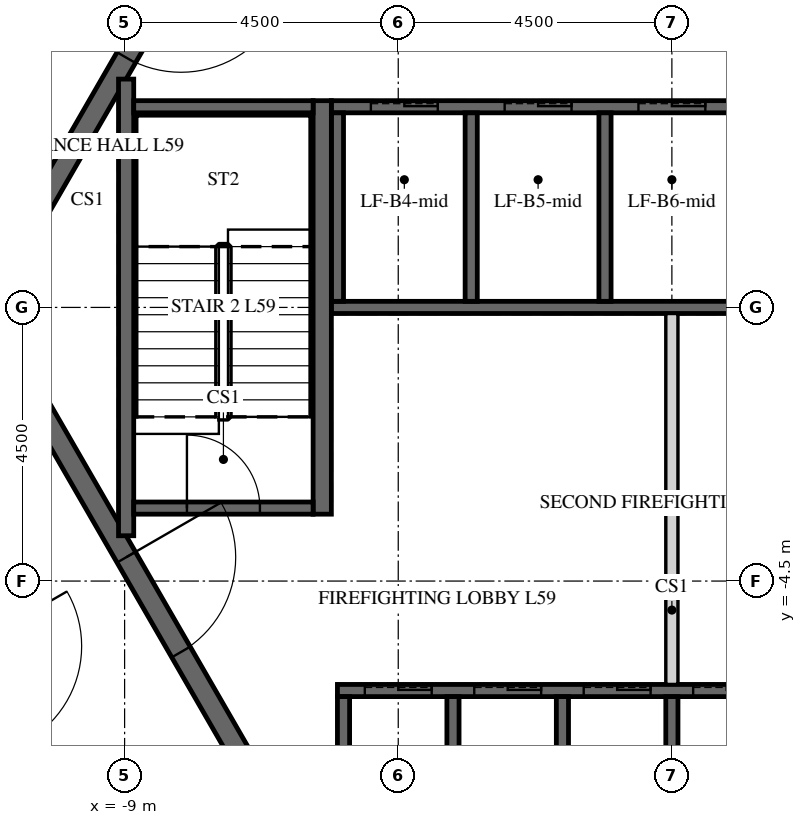
"""IFC4 building model, lengths in metres.
Left out: names, types, materials, properties, quantities, classifications, styles, units other than length and angle.
Written with IfcOpenShell. Run it as: python <this file> out.ifc"""

import sys

from ifc_helpers import new_model, si_unit, direction, frame, frame_2d, origin, place, context, subcontext, project, spatial, polyline, rectangle, outline, extrude, element, fill, save


model = new_model("IFC4")
c1 = context("Model", 3, precision=1e-05, world=origin(), true_north=direction((0.0, 1.0)))
c2 = subcontext(c1, "Body", "Model", "MODEL_VIEW")
j1 = project(units=[si_unit("LENGTHUNIT", "METRE"), si_unit("PLANEANGLEUNIT", "RADIAN")], contexts=[c1])
p1 = place(None, origin())
s1 = spatial("IfcSite", under=j1, at=p1, CompositionType="ELEMENT")
p2 = place(p1, origin())
s2 = spatial("IfcBuilding", under=s1, at=p2, CompositionType="ELEMENT")
p3 = place(p2, frame((0.0, 0.0, 246.3)))
s3 = spatial("IfcBuildingStorey", under=s2, at=p3, CompositionType="ELEMENT", Elevation=246.3)
p4 = place(p3, frame((-7.361, 12.75, -0.15), z_axis=(0.0, 0.0, 1.0), x_axis=(-0.50000571537, -0.866022103989, 0.0)))
e1 = element("IfcWall", 1, at=p4, inside=s3, PredefinedType="SHEAR", context=c2, shape_type="SweptSolid", body=[
    extrude(outline(polyline([(-0.144, -0.25), (14.867, -0.25), (14.578, 0.25), (0.144, 0.25), (-0.144, -0.25)])), origin(), (0.0, 0.0, 1.0), 3.75),
])
p5 = place(p4, frame((6.49, 0.0, 0.15)))
e2 = element("IfcOpeningElement", 2, at=p5, cuts=e1, PredefinedType="OPENING", context=c2, shape_type="SweptSolid", body=[
    extrude(rectangle(XDim=1.8, YDim=2.4, at=frame_2d((0.9, 1.2))), frame((0.0, 0.26, 0.0), z_axis=(0.0, -1.0, 0.0), x_axis=(1.0, 0.0, 0.0)), (0.0, 0.0, 1.0), 0.52),
])
p6 = place(p3, frame((-14.722, 0.0, -0.15), z_axis=(0.0, 0.0, 1.0), x_axis=(0.50000571537, -0.866022103989, 0.0)))
e3 = element("IfcWall", 3, at=p6, inside=s3, PredefinedType="SHEAR", context=c2, shape_type="SweptSolid", body=[
    extrude(outline(polyline([(-0.144, -0.25), (14.867, -0.25), (14.578, 0.25), (0.144, 0.25), (-0.144, -0.25)])), origin(), (0.0, 0.0, 1.0), 3.75),
])
p7 = place(p6, frame((6.432, 0.0, 0.15)))
e4 = element("IfcOpeningElement", 4, at=p7, cuts=e3, PredefinedType="OPENING", context=c2, shape_type="SweptSolid", body=[
    extrude(rectangle(XDim=1.8, YDim=2.4, at=frame_2d((0.9, 1.2))), frame((0.0, 0.26, 0.0), z_axis=(0.0, -1.0, 0.0), x_axis=(1.0, 0.0, 0.0)), (0.0, 0.0, 1.0), 0.52),
])
p8 = place(p3, frame((-5.673, 9.825, -0.15), z_axis=(0.0, 0.0, 1.0), x_axis=(-0.499995046907, -0.866028263435, 0.0)))
e5 = element("IfcWall", 5, at=p8, inside=s3, PredefinedType="SHEAR", context=c2, shape_type="SweptSolid", body=[
    extrude(outline(polyline([(-0.101, -0.175), (11.446, -0.175), (11.244, 0.175), (0.101, 0.175), (-0.101, -0.175)])), origin(), (0.0, 0.0, 1.0), 3.75),
])
p9 = place(p8, frame((4.801, 0.0, 0.15)))
e6 = element("IfcOpeningElement", 6, at=p9, cuts=e5, PredefinedType="OPENING", context=c2, shape_type="SweptSolid", body=[
    extrude(rectangle(XDim=1.8, YDim=2.4, at=frame_2d((0.9, 1.2))), frame((0.0, 0.185, 0.0), z_axis=(0.0, -1.0, 0.0), x_axis=(1.0, 0.0, 0.0)), (0.0, 0.0, 1.0), 0.37),
])
p10 = place(p3, frame((-11.345, 0.0, -0.15), z_axis=(0.0, 0.0, 1.0), x_axis=(0.499995046907, -0.866028263435, 0.0)))
e7 = element("IfcWall", 7, at=p10, inside=s3, PredefinedType="SHEAR", context=c2, shape_type="SweptSolid", body=[
    extrude(outline(polyline([(-0.101, -0.175), (11.446, -0.175), (11.244, 0.175), (0.101, 0.175), (-0.101, -0.175)])), origin(), (0.0, 0.0, 1.0), 3.75),
])
p11 = place(p10, frame((4.744, 0.0, 0.15)))
e8 = element("IfcOpeningElement", 8, at=p11, cuts=e7, PredefinedType="OPENING", context=c2, shape_type="SweptSolid", body=[
    extrude(rectangle(XDim=1.8, YDim=2.4, at=frame_2d((0.9, 1.2))), frame((0.0, 0.185, 0.0), z_axis=(0.0, -1.0, 0.0), x_axis=(1.0, 0.0, 0.0)), (0.0, 0.0, 1.0), 0.37),
])
p12 = place(p3, frame((-5.6, 3.3, -0.25), z_axis=(0.0, 0.0, 1.0), x_axis=(1.0, 0.0, 0.0)))
e9 = element("IfcWall", 9, at=p12, inside=s3, PredefinedType="SHEAR", context=c2, shape_type="SweptSolid", body=[
    extrude(rectangle(XDim=11.2, YDim=0.2, at=frame_2d((5.6, 0.0))), origin(), (0.0, 0.0, 1.0), 3.9),
])
p13 = place(p12, frame((0.65, 0.0, 0.25)))
e10 = element("IfcOpeningElement", 10, at=p13, cuts=e9, PredefinedType="OPENING", context=c2, shape_type="SweptSolid", body=[
    extrude(rectangle(XDim=1.1, YDim=2.1, at=frame_2d((0.55, 1.05))), frame((0.0, 0.11, 0.0), z_axis=(0.0, -1.0, 0.0), x_axis=(1.0, 0.0, 0.0)), (0.0, 0.0, 1.0), 0.22),
])
p14 = place(p12, frame((2.85, 0.0, 0.25)))
e11 = element("IfcOpeningElement", 11, at=p14, cuts=e9, PredefinedType="OPENING", context=c2, shape_type="SweptSolid", body=[
    extrude(rectangle(XDim=1.1, YDim=2.1, at=frame_2d((0.55, 1.05))), frame((0.0, 0.11, 0.0), z_axis=(0.0, -1.0, 0.0), x_axis=(1.0, 0.0, 0.0)), (0.0, 0.0, 1.0), 0.22),
])
p15 = place(p12, frame((5.05, 0.0, 0.25)))
e12 = element("IfcOpeningElement", 12, at=p15, cuts=e9, PredefinedType="OPENING", context=c2, shape_type="SweptSolid", body=[
    extrude(rectangle(XDim=1.1, YDim=2.1, at=frame_2d((0.55, 1.05))), frame((0.0, 0.11, 0.0), z_axis=(0.0, -1.0, 0.0), x_axis=(1.0, 0.0, 0.0)), (0.0, 0.0, 1.0), 0.22),
])
p16 = place(p12, frame((7.25, 0.0, 0.25)))
e13 = element("IfcOpeningElement", 13, at=p16, cuts=e9, PredefinedType="OPENING", context=c2, shape_type="SweptSolid", body=[
    extrude(rectangle(XDim=1.1, YDim=2.1, at=frame_2d((0.55, 1.05))), frame((0.0, 0.11, 0.0), z_axis=(0.0, -1.0, 0.0), x_axis=(1.0, 0.0, 0.0)), (0.0, 0.0, 1.0), 0.22),
])
p17 = place(p12, frame((9.45, 0.0, 0.25)))
e14 = element("IfcOpeningElement", 14, at=p17, cuts=e9, PredefinedType="OPENING", context=c2, shape_type="SweptSolid", body=[
    extrude(rectangle(XDim=1.1, YDim=2.1, at=frame_2d((0.55, 1.05))), frame((0.0, 0.11, 0.0), z_axis=(0.0, -1.0, 0.0), x_axis=(1.0, 0.0, 0.0)), (0.0, 0.0, 1.0), 0.22),
])
p18 = place(p3, frame((-5.6, 0.0, -0.25), z_axis=(0.0, 0.0, 1.0), x_axis=(1.0, 0.0, 0.0)))
e15 = element("IfcWall", 15, at=p18, inside=s3, PredefinedType="SHEAR", context=c2, shape_type="SweptSolid", body=[
    extrude(rectangle(XDim=11.2, YDim=0.2, at=frame_2d((5.6, 0.0))), origin(), (0.0, 0.0, 1.0), 3.9),
])
for number, where, z_axis, x_axis in (
    (16, (-5.5, 0.1, -0.25), (0.0, 0.0, 1.0), (0.0, 1.0, 0.0)),
    (17, (-3.3, 0.1, -0.25), (0.0, 0.0, 1.0), (0.0, 1.0, 0.0)),
    (18, (-1.1, 0.1, -0.25), (0.0, 0.0, 1.0), (0.0, 1.0, 0.0)),
):
    element("IfcWall", number, at=place(p3, frame(where, z_axis=z_axis, x_axis=x_axis)), inside=s3, PredefinedType="SHEAR", context=c2, shape_type="SweptSolid", body=[
        extrude(rectangle(XDim=3.1, YDim=0.2, at=frame_2d((1.55, 0.0))), origin(), (0.0, 0.0, 1.0), 3.9),
    ])
p19 = place(p3, frame((-5.5, -6.3, -0.25), z_axis=(0.0, 0.0, 1.0), x_axis=(1.0, 0.0, 0.0)))
e19 = element("IfcWall", 19, at=p19, inside=s3, PredefinedType="SHEAR", context=c2, shape_type="SweptSolid", body=[
    extrude(rectangle(XDim=9.2, YDim=0.2, at=frame_2d((4.6, 0.0))), origin(), (0.0, 0.0, 1.0), 3.9),
])
p20 = place(p19, frame((0.45, 0.0, 0.25)))
e20 = element("IfcOpeningElement", 20, at=p20, cuts=e19, PredefinedType="OPENING", context=c2, shape_type="SweptSolid", body=[
    extrude(rectangle(XDim=1.1, YDim=2.1, at=frame_2d((0.55, 1.05))), frame((0.0, 0.11, 0.0), z_axis=(0.0, -1.0, 0.0), x_axis=(1.0, 0.0, 0.0)), (0.0, 0.0, 1.0), 0.22),
])
p21 = place(p19, frame((2.25, 0.0, 0.25)))
e21 = element("IfcOpeningElement", 21, at=p21, cuts=e19, PredefinedType="OPENING", context=c2, shape_type="SweptSolid", body=[
    extrude(rectangle(XDim=1.1, YDim=2.1, at=frame_2d((0.55, 1.05))), frame((0.0, 0.11, 0.0), z_axis=(0.0, -1.0, 0.0), x_axis=(1.0, 0.0, 0.0)), (0.0, 0.0, 1.0), 0.22),
])
p22 = place(p19, frame((4.05, 0.0, 0.25)))
e22 = element("IfcOpeningElement", 22, at=p22, cuts=e19, PredefinedType="OPENING", context=c2, shape_type="SweptSolid", body=[
    extrude(rectangle(XDim=1.1, YDim=2.1, at=frame_2d((0.55, 1.05))), frame((0.0, 0.11, 0.0), z_axis=(0.0, -1.0, 0.0), x_axis=(1.0, 0.0, 0.0)), (0.0, 0.0, 1.0), 0.22),
])
p23 = place(p19, frame((5.85, 0.0, 0.25)))
e23 = element("IfcOpeningElement", 23, at=p23, cuts=e19, PredefinedType="OPENING", context=c2, shape_type="SweptSolid", body=[
    extrude(rectangle(XDim=1.1, YDim=2.1, at=frame_2d((0.55, 1.05))), frame((0.0, 0.11, 0.0), z_axis=(0.0, -1.0, 0.0), x_axis=(1.0, 0.0, 0.0)), (0.0, 0.0, 1.0), 0.22),
])
p24 = place(p19, frame((7.65, 0.0, 0.25)))
e24 = element("IfcOpeningElement", 24, at=p24, cuts=e19, PredefinedType="OPENING", context=c2, shape_type="SweptSolid", body=[
    extrude(rectangle(XDim=1.1, YDim=2.1, at=frame_2d((0.55, 1.05))), frame((0.0, 0.11, 0.0), z_axis=(0.0, -1.0, 0.0), x_axis=(1.0, 0.0, 0.0)), (0.0, 0.0, 1.0), 0.22),
])
for number, where, z_axis, x_axis in (
    (25, (-5.4, -9.3, -0.25), (0.0, 0.0, 1.0), (0.0, 1.0, 0.0)),
    (26, (-3.6, -9.3, -0.25), (0.0, 0.0, 1.0), (0.0, 1.0, 0.0)),
    (27, (-1.8, -9.3, -0.25), (0.0, 0.0, 1.0), (0.0, 1.0, 0.0)),
    (28, (0.0, -9.3, -0.25), (0.0, 0.0, 1.0), (0.0, 1.0, 0.0)),
):
    element("IfcWall", number, at=place(p3, frame(where, z_axis=z_axis, x_axis=x_axis)), inside=s3, PredefinedType="SHEAR", context=c2, shape_type="SweptSolid", body=[
        extrude(rectangle(XDim=2.9, YDim=0.2, at=frame_2d((1.45, 0.0))), origin(), (0.0, 0.0, 1.0), 3.9),
    ])
p25 = place(p3, frame((0.0, -6.2, 0.0), z_axis=(0.0, 0.0, 1.0), x_axis=(0.0, 1.0, 0.0)))
e29 = element("IfcWall", 29, at=p25, inside=s3, PredefinedType="PARTITIONING", context=c2, shape_type="SweptSolid", body=[
    extrude(rectangle(XDim=6.1, YDim=0.2, at=frame_2d((3.05, 0.0))), origin(), (0.0, 0.0, 1.0), 3.65),
])
p26 = place(p3, frame((-5.75, -3.4, -0.25), z_axis=(0.0, 0.0, 1.0), x_axis=(0.0, 1.0, 0.0)))
e30 = element("IfcWall", 30, at=p26, inside=s3, PredefinedType="SHEAR", context=c2, shape_type="SweptSolid", body=[
    extrude(rectangle(XDim=6.8, YDim=0.3, at=frame_2d((3.4, 0.0))), origin(), (0.0, 0.0, 1.0), 3.9),
])
p27 = place(p3, frame((-8.975, -3.755, -0.25), z_axis=(0.0, 0.0, 1.0), x_axis=(0.0, 1.0, 0.0)))
e31 = element("IfcWall", 31, at=p27, inside=s3, PredefinedType="SHEAR", context=c2, shape_type="SweptSolid", body=[
    extrude(rectangle(XDim=7.51, YDim=0.25, at=frame_2d((3.755, 0.0))), origin(), (0.0, 0.0, 1.0), 3.9),
])
p28 = place(p3, frame((-8.85, 3.3, -0.25), z_axis=(0.0, 0.0, 1.0), x_axis=(1.0, 0.0, 0.0)))
e32 = element("IfcWall", 32, at=p28, inside=s3, PredefinedType="SHEAR", context=c2, shape_type="SweptSolid", body=[
    extrude(rectangle(XDim=2.95, YDim=0.2, at=frame_2d((1.475, 0.0))), origin(), (0.0, 0.0, 1.0), 3.9),
])
p29 = place(p3, frame((-8.85, -3.3, -0.25), z_axis=(0.0, 0.0, 1.0), x_axis=(1.0, 0.0, 0.0)))
e33 = element("IfcWall", 33, at=p29, inside=s3, PredefinedType="SHEAR", context=c2, shape_type="SweptSolid", body=[
    extrude(rectangle(XDim=2.95, YDim=0.2, at=frame_2d((1.475, 0.0))), origin(), (0.0, 0.0, 1.0), 3.9),
])
p30 = place(p29, frame((0.875, 0.0, 0.25)))
e34 = element("IfcOpeningElement", 34, at=p30, cuts=e33, PredefinedType="OPENING", context=c2, shape_type="SweptSolid", body=[
    extrude(rectangle(XDim=1.2, YDim=2.4, at=frame_2d((0.6, 1.2))), frame((0.0, 0.11, 0.0), z_axis=(0.0, -1.0, 0.0), x_axis=(1.0, 0.0, 0.0)), (0.0, 0.0, 1.0), 0.22),
])
p31 = place(p3, frame((-8.673, 14.978, 0.0), z_axis=(0.0, 0.0, 1.0), x_axis=(-0.50000700621, -0.86602135871, 0.0)))
e35 = element("IfcWall", 35, at=p31, inside=s3, PredefinedType="PARTITIONING", context=c2, shape_type="SweptSolid", body=[
    extrude(rectangle(XDim=14.928, YDim=0.15, at=frame_2d((7.464, 0.0))), origin(), (0.0, 0.0, 1.0), 2.838),
])
p32 = place(p31, frame((4.454, 0.0, 0.0)))
e36 = element("IfcOpeningElement", 36, at=p32, cuts=e35, PredefinedType="OPENING", context=c2, shape_type="SweptSolid", body=[
    extrude(rectangle(XDim=1.0, YDim=2.1, at=frame_2d((0.5, 1.05))), frame((0.0, 0.085, 0.0), z_axis=(0.0, -1.0, 0.0), x_axis=(1.0, 0.0, 0.0)), (0.0, 0.0, 1.0), 0.17),
])
p33 = place(p31, frame((11.264, 0.0, 0.0)))
e37 = element("IfcOpeningElement", 37, at=p33, cuts=e35, PredefinedType="OPENING", context=c2, shape_type="SweptSolid", body=[
    extrude(rectangle(XDim=1.0, YDim=2.1, at=frame_2d((0.5, 1.05))), frame((0.0, 0.085, 0.0), z_axis=(0.0, -1.0, 0.0), x_axis=(1.0, 0.0, 0.0)), (0.0, 0.0, 1.0), 0.17),
])
p34 = place(p3, frame((-15.094, -3.856, 0.0), z_axis=(0.0, 0.0, 1.0), x_axis=(0.500006037985, -0.866021917724, 0.0)))
e38 = element("IfcWall", 38, at=p34, inside=s3, PredefinedType="PARTITIONING", context=c2, shape_type="SweptSolid", body=[
    extrude(rectangle(XDim=12.867, YDim=0.15, at=frame_2d((6.434, 0.0))), origin(), (0.0, 0.0, 1.0), 2.838),
])
p35 = place(p34, frame((6.125, 0.0, 0.0)))
e39 = element("IfcOpeningElement", 39, at=p35, cuts=e38, PredefinedType="OPENING", context=c2, shape_type="SweptSolid", body=[
    extrude(rectangle(XDim=1.0, YDim=2.1, at=frame_2d((0.5, 1.05))), frame((0.0, 0.085, 0.0), z_axis=(0.0, -1.0, 0.0), x_axis=(1.0, 0.0, 0.0)), (0.0, 0.0, 1.0), 0.17),
])
p36 = place(p9, origin())
e40 = element("IfcDoor", 40, at=p36, inside=s3, OperationType="DOUBLE_DOOR_SINGLE_SWING", PredefinedType="DOOR", context=c2, shape_type="SweptSolid", body=[
    extrude(rectangle(XDim=1.8, YDim=2.4, at=frame_2d((0.9, 1.2))), frame((0.0, 0.025, 0.0), z_axis=(0.0, -1.0, 0.0), x_axis=(1.0, 0.0, 0.0)), (0.0, 0.0, 1.0), 0.05),
])
fill(e6, e40)
p37 = place(p11, origin())
e41 = element("IfcDoor", 41, at=p37, inside=s3, OperationType="DOUBLE_DOOR_SINGLE_SWING", PredefinedType="DOOR", context=c2, shape_type="SweptSolid", body=[
    extrude(rectangle(XDim=1.8, YDim=2.4, at=frame_2d((0.9, 1.2))), frame((0.0, 0.025, 0.0), z_axis=(0.0, -1.0, 0.0), x_axis=(1.0, 0.0, 0.0)), (0.0, 0.0, 1.0), 0.05),
])
fill(e8, e41)
p38 = place(p30, origin())
e42 = element("IfcDoor", 42, at=p38, inside=s3, OperationType="SINGLE_SWING_LEFT", PredefinedType="DOOR", context=c2, shape_type="SweptSolid", body=[
    extrude(rectangle(XDim=1.2, YDim=2.4, at=frame_2d((0.6, 1.2))), frame((0.0, 0.025, 0.0), z_axis=(0.0, -1.0, 0.0), x_axis=(1.0, 0.0, 0.0)), (0.0, 0.0, 1.0), 0.05),
])
fill(e34, e42)
p39 = place(p13, origin())
e43 = element("IfcDoor", 43, at=p39, inside=s3, OperationType="SLIDING_TO_LEFT", PredefinedType="DOOR", context=c2, shape_type="SweptSolid", body=[
    extrude(rectangle(XDim=1.1, YDim=2.1, at=frame_2d((0.55, 1.05))), frame((0.0, 0.025, 0.0), z_axis=(0.0, -1.0, 0.0), x_axis=(1.0, 0.0, 0.0)), (0.0, 0.0, 1.0), 0.05),
])
fill(e10, e43)
p40 = place(p14, origin())
e44 = element("IfcDoor", 44, at=p40, inside=s3, OperationType="SLIDING_TO_LEFT", PredefinedType="DOOR", context=c2, shape_type="SweptSolid", body=[
    extrude(rectangle(XDim=1.1, YDim=2.1, at=frame_2d((0.55, 1.05))), frame((0.0, 0.025, 0.0), z_axis=(0.0, -1.0, 0.0), x_axis=(1.0, 0.0, 0.0)), (0.0, 0.0, 1.0), 0.05),
])
fill(e11, e44)
p41 = place(p15, origin())
e45 = element("IfcDoor", 45, at=p41, inside=s3, OperationType="SLIDING_TO_LEFT", PredefinedType="DOOR", context=c2, shape_type="SweptSolid", body=[
    extrude(rectangle(XDim=1.1, YDim=2.1, at=frame_2d((0.55, 1.05))), frame((0.0, 0.025, 0.0), z_axis=(0.0, -1.0, 0.0), x_axis=(1.0, 0.0, 0.0)), (0.0, 0.0, 1.0), 0.05),
])
fill(e12, e45)
p42 = place(p20, origin())
e46 = element("IfcDoor", 46, at=p42, inside=s3, OperationType="SLIDING_TO_LEFT", PredefinedType="DOOR", context=c2, shape_type="SweptSolid", body=[
    extrude(rectangle(XDim=1.1, YDim=2.1, at=frame_2d((0.55, 1.05))), frame((0.0, 0.025, 0.0), z_axis=(0.0, -1.0, 0.0), x_axis=(1.0, 0.0, 0.0)), (0.0, 0.0, 1.0), 0.05),
])
fill(e20, e46)
p43 = place(p21, origin())
e47 = element("IfcDoor", 47, at=p43, inside=s3, OperationType="SLIDING_TO_LEFT", PredefinedType="DOOR", context=c2, shape_type="SweptSolid", body=[
    extrude(rectangle(XDim=1.1, YDim=2.1, at=frame_2d((0.55, 1.05))), frame((0.0, 0.025, 0.0), z_axis=(0.0, -1.0, 0.0), x_axis=(1.0, 0.0, 0.0)), (0.0, 0.0, 1.0), 0.05),
])
fill(e21, e47)
p44 = place(p22, origin())
e48 = element("IfcDoor", 48, at=p44, inside=s3, OperationType="SLIDING_TO_LEFT", PredefinedType="DOOR", context=c2, shape_type="SweptSolid", body=[
    extrude(rectangle(XDim=1.1, YDim=2.1, at=frame_2d((0.55, 1.05))), frame((0.0, 0.025, 0.0), z_axis=(0.0, -1.0, 0.0), x_axis=(1.0, 0.0, 0.0)), (0.0, 0.0, 1.0), 0.05),
])
fill(e22, e48)
p45 = place(p23, origin())
e49 = element("IfcDoor", 49, at=p45, inside=s3, OperationType="SLIDING_TO_LEFT", PredefinedType="DOOR", context=c2, shape_type="SweptSolid", body=[
    extrude(rectangle(XDim=1.1, YDim=2.1, at=frame_2d((0.55, 1.05))), frame((0.0, 0.025, 0.0), z_axis=(0.0, -1.0, 0.0), x_axis=(1.0, 0.0, 0.0)), (0.0, 0.0, 1.0), 0.05),
])
fill(e23, e49)
save(model, sys.argv[1])
